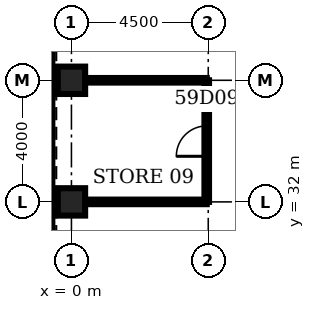
"""IFC4 building model, lengths in metres.
Left out: names, types, materials, properties, quantities, classifications, styles, units other than length and angle.
Written with IfcOpenShell. Run it as: python <this file> out.ifc"""

import sys

from ifc_helpers import new_model, si_unit, direction, frame, frame_2d, origin, origin_2d, place, context, subcontext, project, spatial, rectangle, hollow_rectangle, extrude, element, fill, save


model = new_model("IFC4")
c1 = context("Model", 3, precision=1e-05, world=origin(), true_north=direction((0.0, 1.0)))
c2 = subcontext(c1, "Body", "Model", "MODEL_VIEW")
j1 = project(units=[si_unit("LENGTHUNIT", "METRE"), si_unit("PLANEANGLEUNIT", "RADIAN")], contexts=[c1])
p1 = place(None, origin())
s1 = spatial("IfcSite", under=j1, at=p1, CompositionType="ELEMENT")
p2 = place(p1, origin())
s2 = spatial("IfcBuilding", under=s1, at=p2, CompositionType="ELEMENT")
p3 = place(p2, frame((0.0, 0.0, 261.4)))
s3 = spatial("IfcBuildingStorey", under=s2, at=p3, CompositionType="ELEMENT", Elevation=261.4)
for number, where, z_axis, x_axis in (
    (1, (0.0, 36.0, 0.0), (0.0, 0.0, 1.0), (1.0, 0.0, 0.0)),
    (2, (0.0, 32.0, 0.0), (0.0, 0.0, 1.0), (1.0, 0.0, 0.0)),
):
    element("IfcColumn", number, at=place(p3, frame(where, z_axis=z_axis, x_axis=x_axis)), inside=s3, PredefinedType="COLUMN", context=c2, shape_type="SweptSolid", body=[
        extrude(hollow_rectangle(XDim=0.9, YDim=0.9, WallThickness=0.07, at=origin_2d()), origin(), (0.0, 0.0, 1.0), 4.2),
    ])
p4 = place(p3, frame((0.45, 32.0, 0.0), z_axis=(0.0, 0.0, 1.0), x_axis=(1.0, 0.0, 0.0)))
e3 = element("IfcWall", 3, at=p4, inside=s3, PredefinedType="PARTITIONING", context=c2, shape_type="SweptSolid", body=[
    extrude(rectangle(XDim=4.0, YDim=0.15, at=frame_2d((2.0, 0.0))), origin(), (0.0, 0.0, 1.0), 2.93),
])
p5 = place(p3, frame((0.45, 36.0, 0.0), z_axis=(0.0, 0.0, 1.0), x_axis=(1.0, 0.0, 0.0)))
e4 = element("IfcWall", 4, at=p5, inside=s3, PredefinedType="PARTITIONING", context=c2, shape_type="SweptSolid", body=[
    extrude(rectangle(XDim=4.0, YDim=0.15, at=frame_2d((2.0, 0.0))), origin(), (0.0, 0.0, 1.0), 3.0),
])
p6 = place(p3, frame((4.45, 32.0, 0.0), z_axis=(0.0, 0.0, 1.0), x_axis=(0.0, 1.0, 0.0)))
e5 = element("IfcWall", 5, at=p6, inside=s3, PredefinedType="PARTITIONING", context=c2, shape_type="SweptSolid", body=[
    extrude(rectangle(XDim=4.0, YDim=0.15, at=frame_2d((2.0, 0.0))), origin(), (0.0, 0.0, 1.0), 3.0),
])
p7 = place(p6, frame((1.5, 0.0, 0.0)))
e6 = element("IfcOpeningElement", 6, at=p7, cuts=e5, PredefinedType="OPENING", context=c2, shape_type="SweptSolid", body=[
    extrude(rectangle(XDim=1.0, YDim=2.1, at=frame_2d((0.5, 1.05))), frame((0.0, 0.085, 0.0), z_axis=(0.0, -1.0, 0.0), x_axis=(1.0, 0.0, 0.0)), (0.0, 0.0, 1.0), 0.17),
])
p8 = place(p7, origin())
e7 = element("IfcDoor", 7, at=p8, inside=s3, OperationType="SINGLE_SWING_LEFT", PredefinedType="DOOR", context=c2, shape_type="SweptSolid", body=[
    extrude(rectangle(XDim=1.0, YDim=2.1, at=frame_2d((0.5, 1.05))), frame((0.0, 0.025, 0.0), z_axis=(0.0, -1.0, 0.0), x_axis=(1.0, 0.0, 0.0)), (0.0, 0.0, 1.0), 0.05),
])
fill(e6, e7)
save(model, sys.argv[1])
